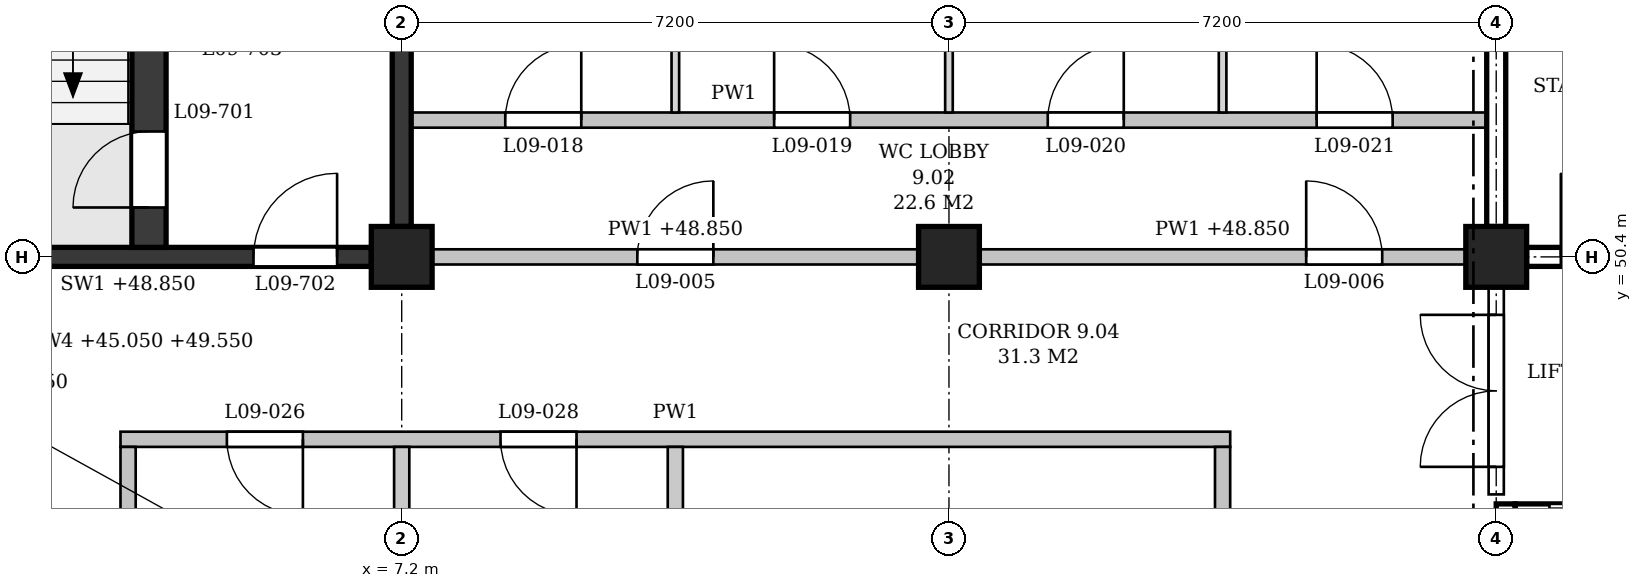
"""IFC4 building model, lengths in metres.
Left out: names, types, materials, properties, quantities, classifications, styles, units other than length and angle.
Written with IfcOpenShell. Run it as: python <this file> out.ifc"""

import sys

from ifc_helpers import new_model, si_unit, direction, frame, frame_2d, origin, origin_2d, place, context, subcontext, project, spatial, polyline, rectangle, outline, extrude, element, fill, save


model = new_model("IFC4")
c1 = context("Model", 3, precision=1e-05, world=origin(), true_north=direction((0.0, 1.0)))
c2 = subcontext(c1, "Body", "Model", "MODEL_VIEW")
j1 = project(units=[si_unit("LENGTHUNIT", "METRE"), si_unit("PLANEANGLEUNIT", "RADIAN")], contexts=[c1])
p1 = place(None, origin())
s1 = spatial("IfcSite", under=j1, at=p1, CompositionType="ELEMENT")
p2 = place(p1, origin())
s2 = spatial("IfcBuilding", under=s1, at=p2, CompositionType="ELEMENT")
p3 = place(p2, frame((0.0, 0.0, 45.3)))
s3 = spatial("IfcBuildingStorey", under=s2, at=p3, CompositionType="ELEMENT", Elevation=45.3)
for number, where, z_axis, x_axis in (
    (1, (7.2, 50.4, 0.0), (0.0, 0.0, 1.0), (1.0, 0.0, 0.0)),
    (2, (14.4, 50.4, 0.0), (0.0, 0.0, 1.0), (1.0, 0.0, 0.0)),
    (3, (21.6, 50.4, 0.0), (0.0, 0.0, 1.0), (1.0, 0.0, 0.0)),
):
    element("IfcColumn", number, at=place(p3, frame(where, z_axis=z_axis, x_axis=x_axis)), inside=s3, PredefinedType="COLUMN", context=c2, shape_type="SweptSolid", body=[
        extrude(rectangle(XDim=0.8, YDim=0.8, at=origin_2d()), origin(), (0.0, 0.0, 1.0), 4.5),
    ])
p4 = place(p3, frame((0.4, 50.4, 0.0), z_axis=(0.0, 0.0, 1.0), x_axis=(1.0, 0.0, 0.0)))
e4 = element("IfcWall", 4, at=p4, inside=s3, PredefinedType="SHEAR", context=c2, shape_type="SweptSolid", body=[
    extrude(rectangle(XDim=6.4, YDim=0.25, at=frame_2d((3.2, 0.0))), origin(), (0.0, 0.0, 1.0), 3.55),
])
p5 = place(p4, frame((4.85, 0.0, 0.0)))
e5 = element("IfcOpeningElement", 5, at=p5, cuts=e4, PredefinedType="OPENING", context=c2, shape_type="SweptSolid", body=[
    extrude(rectangle(XDim=1.1, YDim=2.1, at=frame_2d((0.55, 1.05))), frame((0.0, 0.135, 0.0), z_axis=(0.0, -1.0, 0.0), x_axis=(1.0, 0.0, 0.0)), (0.0, 0.0, 1.0), 0.27),
])
p6 = place(p3, frame((7.2, 50.8, 0.0), z_axis=(0.0, 0.0, 1.0), x_axis=(0.0, 1.0, 0.0)))
e6 = element("IfcWall", 6, at=p6, inside=s3, PredefinedType="SHEAR", context=c2, shape_type="SweptSolid", body=[
    extrude(rectangle(XDim=6.4, YDim=0.25, at=frame_2d((3.2, 0.0))), origin(), (0.0, 0.0, 1.0), 3.55),
])
p7 = place(p3, frame((3.875, 50.525, 0.0), z_axis=(0.0, 0.0, 1.0), x_axis=(0.0, 1.0, 0.0)))
e7 = element("IfcWall", 7, at=p7, inside=s3, PredefinedType="SHEAR", context=c2, shape_type="SweptSolid", body=[
    extrude(rectangle(XDim=6.925, YDim=0.45, at=frame_2d((3.462, 0.0))), origin(), (0.0, 0.0, 1.0), 4.25),
])
p8 = place(p7, frame((0.525, 0.0, 0.0)))
e8 = element("IfcOpeningElement", 8, at=p8, cuts=e7, PredefinedType="OPENING", context=c2, shape_type="SweptSolid", body=[
    extrude(rectangle(XDim=1.0, YDim=2.1, at=frame_2d((0.5, 1.05))), frame((0.0, 0.235, 0.0), z_axis=(0.0, -1.0, 0.0), x_axis=(1.0, 0.0, 0.0)), (0.0, 0.0, 1.0), 0.47),
])
p9 = place(p3, frame((22.0, 50.4, 0.0), z_axis=(0.0, 0.0, 1.0), x_axis=(1.0, 0.0, 0.0)))
e9 = element("IfcWall", 9, at=p9, inside=s3, PredefinedType="SHEAR", context=c2, shape_type="SweptSolid", body=[
    extrude(rectangle(XDim=6.4, YDim=0.25, at=frame_2d((3.2, 0.0))), origin(), (0.0, 0.0, 1.0), 3.55),
])
p10 = place(p9, frame((0.45, 0.0, 0.0)))
e10 = element("IfcOpeningElement", 10, at=p10, cuts=e9, PredefinedType="OPENING", context=c2, shape_type="SweptSolid", body=[
    extrude(rectangle(XDim=1.1, YDim=2.1, at=frame_2d((0.55, 1.05))), frame((0.0, 0.135, 0.0), z_axis=(0.0, -1.0, 0.0), x_axis=(1.0, 0.0, 0.0)), (0.0, 0.0, 1.0), 0.27),
])
p11 = place(p3, frame((21.6, 50.8, 0.0), z_axis=(0.0, 0.0, 1.0), x_axis=(0.0, 1.0, 0.0)))
e11 = element("IfcWall", 11, at=p11, inside=s3, PredefinedType="SHEAR", context=c2, shape_type="SweptSolid", body=[
    extrude(rectangle(XDim=6.4, YDim=0.25, at=frame_2d((3.2, 0.0))), origin(), (0.0, 0.0, 1.0), 3.55),
])
p12 = place(p3, frame((21.725, 43.6, -0.25), z_axis=(0.0, 0.0, 1.0), x_axis=(0.0, 1.0, 0.0)))
e12 = element("IfcWall", 12, at=p12, inside=s3, PredefinedType="SHEAR", context=c2, shape_type="SweptSolid", body=[
    extrude(rectangle(XDim=3.55, YDim=0.25, at=frame_2d((1.775, 0.0))), origin(), (0.0, 0.0, 1.0), 3.8),
])
p13 = place(p3, frame((21.85, 47.025, -0.25), z_axis=(0.0, 0.0, 1.0), x_axis=(1.0, 0.0, 0.0)))
e13 = element("IfcWall", 13, at=p13, inside=s3, PredefinedType="SHEAR", context=c2, shape_type="SweptSolid", body=[
    extrude(rectangle(XDim=2.0, YDim=0.25, at=frame_2d((1.0, 0.0))), origin(), (0.0, 0.0, 1.0), 4.5),
])
p14 = place(p13, frame((0.45, 0.0, 0.25)))
e14 = element("IfcOpeningElement", 14, at=p14, cuts=e13, PredefinedType="OPENING", context=c2, shape_type="SweptSolid", body=[
    extrude(rectangle(XDim=1.1, YDim=2.1, at=frame_2d((0.55, 1.05))), frame((0.0, 0.135, 0.0), z_axis=(0.0, -1.0, 0.0), x_axis=(1.0, 0.0, 0.0)), (0.0, 0.0, 1.0), 0.27),
])
p15 = place(p3, frame((3.5, 48.0, 0.0), z_axis=(0.0, 0.0, 1.0), x_axis=(1.0, 0.0, 0.0)))
e15 = element("IfcWall", 15, at=p15, inside=s3, PredefinedType="PARTITIONING", context=c2, shape_type="SweptSolid", body=[
    extrude(outline(polyline([(0.0, 0.0), (14.6, 0.0), (14.6, 4.25), (11.125, 4.25), (11.125, 3.55), (10.675, 3.55), (10.675, 4.25), (3.925, 4.25), (3.925, 3.55), (3.475, 3.55), (3.475, 4.25), (0.0, 4.25), (0.0, 0.0)])), frame((0.0, 0.1, 0.0), z_axis=(0.0, -1.0, 0.0), x_axis=(1.0, 0.0, 0.0)), (0.0, 0.0, 1.0), 0.2),
])
p16 = place(p15, frame((1.4, 0.0, 0.0)))
e16 = element("IfcOpeningElement", 16, at=p16, cuts=e15, PredefinedType="OPENING", context=c2, shape_type="SweptSolid", body=[
    extrude(rectangle(XDim=1.0, YDim=2.1, at=frame_2d((0.5, 1.05))), frame((0.0, 0.11, 0.0), z_axis=(0.0, -1.0, 0.0), x_axis=(1.0, 0.0, 0.0)), (0.0, 0.0, 1.0), 0.22),
])
p17 = place(p15, frame((5.0, 0.0, 0.0)))
e17 = element("IfcOpeningElement", 17, at=p17, cuts=e15, PredefinedType="OPENING", context=c2, shape_type="SweptSolid", body=[
    extrude(rectangle(XDim=1.0, YDim=2.1, at=frame_2d((0.5, 1.05))), frame((0.0, 0.11, 0.0), z_axis=(0.0, -1.0, 0.0), x_axis=(1.0, 0.0, 0.0)), (0.0, 0.0, 1.0), 0.22),
])
p18 = place(p3, frame((7.6, 50.4, 0.0), z_axis=(0.0, 0.0, 1.0), x_axis=(1.0, 0.0, 0.0)))
e18 = element("IfcWall", 18, at=p18, inside=s3, PredefinedType="PARTITIONING", context=c2, shape_type="SweptSolid", body=[
    extrude(rectangle(XDim=6.4, YDim=0.2, at=frame_2d((3.2, 0.0))), origin(), (0.0, 0.0, 1.0), 3.55),
])
p19 = place(p18, frame((2.7, 0.0, 0.0)))
e19 = element("IfcOpeningElement", 19, at=p19, cuts=e18, PredefinedType="OPENING", context=c2, shape_type="SweptSolid", body=[
    extrude(rectangle(XDim=1.0, YDim=2.1, at=frame_2d((0.5, 1.05))), frame((0.0, 0.11, 0.0), z_axis=(0.0, -1.0, 0.0), x_axis=(1.0, 0.0, 0.0)), (0.0, 0.0, 1.0), 0.22),
])
p20 = place(p3, frame((14.8, 50.4, 0.0), z_axis=(0.0, 0.0, 1.0), x_axis=(1.0, 0.0, 0.0)))
e20 = element("IfcWall", 20, at=p20, inside=s3, PredefinedType="PARTITIONING", context=c2, shape_type="SweptSolid", body=[
    extrude(rectangle(XDim=6.4, YDim=0.2, at=frame_2d((3.2, 0.0))), origin(), (0.0, 0.0, 1.0), 3.55),
])
p21 = place(p20, frame((4.3, 0.0, 0.0)))
e21 = element("IfcOpeningElement", 21, at=p21, cuts=e20, PredefinedType="OPENING", context=c2, shape_type="SweptSolid", body=[
    extrude(rectangle(XDim=1.0, YDim=2.1, at=frame_2d((0.5, 1.05))), frame((0.0, 0.11, 0.0), z_axis=(0.0, -1.0, 0.0), x_axis=(1.0, 0.0, 0.0)), (0.0, 0.0, 1.0), 0.22),
])
p22 = place(p3, frame((7.325, 52.2, 0.0), z_axis=(0.0, 0.0, 1.0), x_axis=(1.0, 0.0, 0.0)))
e22 = element("IfcWall", 22, at=p22, inside=s3, PredefinedType="PARTITIONING", context=c2, shape_type="SweptSolid", body=[
    extrude(outline(polyline([(0.0, 0.0), (14.15, 0.0), (14.15, 3.55), (14.05, 3.55), (14.05, 4.25), (7.3, 4.25), (7.3, 3.55), (6.85, 3.55), (6.85, 4.25), (0.1, 4.25), (0.1, 3.55), (0.0, 3.55), (0.0, 0.0)])), frame((0.0, 0.1, 0.0), z_axis=(0.0, -1.0, 0.0), x_axis=(1.0, 0.0, 0.0)), (0.0, 0.0, 1.0), 0.2),
])
p23 = place(p22, frame((1.238, 0.0, 0.0)))
e23 = element("IfcOpeningElement", 23, at=p23, cuts=e22, PredefinedType="OPENING", context=c2, shape_type="SweptSolid", body=[
    extrude(rectangle(XDim=1.0, YDim=2.1, at=frame_2d((0.5, 1.05))), frame((0.0, 0.11, 0.0), z_axis=(0.0, -1.0, 0.0), x_axis=(1.0, 0.0, 0.0)), (0.0, 0.0, 1.0), 0.22),
])
p24 = place(p22, frame((4.775, 0.0, 0.0)))
e24 = element("IfcOpeningElement", 24, at=p24, cuts=e22, PredefinedType="OPENING", context=c2, shape_type="SweptSolid", body=[
    extrude(rectangle(XDim=1.0, YDim=2.1, at=frame_2d((0.5, 1.05))), frame((0.0, 0.11, 0.0), z_axis=(0.0, -1.0, 0.0), x_axis=(1.0, 0.0, 0.0)), (0.0, 0.0, 1.0), 0.22),
])
p25 = place(p22, frame((8.375, 0.0, 0.0)))
e25 = element("IfcOpeningElement", 25, at=p25, cuts=e22, PredefinedType="OPENING", context=c2, shape_type="SweptSolid", body=[
    extrude(rectangle(XDim=1.0, YDim=2.1, at=frame_2d((0.5, 1.05))), frame((0.0, 0.11, 0.0), z_axis=(0.0, -1.0, 0.0), x_axis=(1.0, 0.0, 0.0)), (0.0, 0.0, 1.0), 0.22),
])
p26 = place(p22, frame((11.913, 0.0, 0.0)))
e26 = element("IfcOpeningElement", 26, at=p26, cuts=e22, PredefinedType="OPENING", context=c2, shape_type="SweptSolid", body=[
    extrude(rectangle(XDim=1.0, YDim=2.1, at=frame_2d((0.5, 1.05))), frame((0.0, 0.11, 0.0), z_axis=(0.0, -1.0, 0.0), x_axis=(1.0, 0.0, 0.0)), (0.0, 0.0, 1.0), 0.22),
])
p27 = place(p3, frame((3.6, 46.8, 0.0), z_axis=(0.0, 0.0, 1.0), x_axis=(0.0, 1.0, 0.0)))
e27 = element("IfcWall", 27, at=p27, inside=s3, PredefinedType="PARTITIONING", context=c2, shape_type="SweptSolid", body=[
    extrude(rectangle(XDim=1.1, YDim=0.2, at=frame_2d((0.55, 0.0))), origin(), (0.0, 0.0, 1.0), 4.25),
])
p28 = place(p3, frame((7.2, 43.6, 0.0), z_axis=(0.0, 0.0, 1.0), x_axis=(0.0, 1.0, 0.0)))
e28 = element("IfcWall", 28, at=p28, inside=s3, PredefinedType="PARTITIONING", context=c2, shape_type="SweptSolid", body=[
    extrude(rectangle(XDim=4.3, YDim=0.2, at=frame_2d((2.15, 0.0))), origin(), (0.0, 0.0, 1.0), 3.55),
])
p29 = place(p3, frame((10.8, 36.15, 0.0), z_axis=(0.0, 0.0, 1.0), x_axis=(0.0, 1.0, 0.0)))
e29 = element("IfcWall", 29, at=p29, inside=s3, PredefinedType="PARTITIONING", context=c2, shape_type="SweptSolid", body=[
    extrude(outline(polyline([(0.0, 0.0), (11.75, 0.0), (11.75, 4.25), (7.275, 4.25), (7.275, 3.55), (6.825, 3.55), (6.825, 4.25), (0.05, 4.25), (0.05, 3.65), (0.0, 3.65), (0.0, 0.0)])), frame((0.0, 0.1, 0.0), z_axis=(0.0, -1.0, 0.0), x_axis=(1.0, 0.0, 0.0)), (0.0, 0.0, 1.0), 0.2),
])
p30 = place(p3, frame((10.8, 52.3, 0.0), z_axis=(0.0, 0.0, 1.0), x_axis=(0.0, 1.0, 0.0)))
e30 = element("IfcWall", 30, at=p30, inside=s3, PredefinedType="PARTITIONING", context=c2, shape_type="SweptSolid", body=[
    extrude(rectangle(XDim=5.15, YDim=0.1, at=frame_2d((2.575, 0.0))), origin(), (0.0, 0.0, 1.0), 3.55),
])
p31 = place(p3, frame((14.4, 52.3, 0.0), z_axis=(0.0, 0.0, 1.0), x_axis=(0.0, 1.0, 0.0)))
e31 = element("IfcWall", 31, at=p31, inside=s3, PredefinedType="PARTITIONING", context=c2, shape_type="SweptSolid", body=[
    extrude(rectangle(XDim=4.9, YDim=0.1, at=frame_2d((2.45, 0.0))), origin(), (0.0, 0.0, 1.0), 3.55),
])
p32 = place(p3, frame((18.0, 40.9, 0.0), z_axis=(0.0, 0.0, 1.0), x_axis=(0.0, 1.0, 0.0)))
e32 = element("IfcWall", 32, at=p32, inside=s3, PredefinedType="PARTITIONING", context=c2, shape_type="SweptSolid", body=[
    extrude(outline(polyline([(0.0, 0.0), (7.0, 0.0), (7.0, 4.25), (2.525, 4.25), (2.525, 3.55), (2.075, 3.55), (2.075, 4.25), (0.0, 4.25), (0.0, 0.0)])), frame((0.0, 0.1, 0.0), z_axis=(0.0, -1.0, 0.0), x_axis=(1.0, 0.0, 0.0)), (0.0, 0.0, 1.0), 0.2),
])
p33 = place(p32, frame((3.0, 0.0, 0.0)))
e33 = element("IfcOpeningElement", 33, at=p33, cuts=e32, PredefinedType="OPENING", context=c2, shape_type="SweptSolid", body=[
    extrude(rectangle(XDim=1.0, YDim=2.1, at=frame_2d((0.5, 1.05))), frame((0.0, 0.11, 0.0), z_axis=(0.0, -1.0, 0.0), x_axis=(1.0, 0.0, 0.0)), (0.0, 0.0, 1.0), 0.22),
])
p34 = place(p3, frame((18.0, 52.3, 0.0), z_axis=(0.0, 0.0, 1.0), x_axis=(0.0, 1.0, 0.0)))
e34 = element("IfcWall", 34, at=p34, inside=s3, PredefinedType="PARTITIONING", context=c2, shape_type="SweptSolid", body=[
    extrude(rectangle(XDim=5.15, YDim=0.1, at=frame_2d((2.575, 0.0))), origin(), (0.0, 0.0, 1.0), 3.55),
])
p35 = place(p3, frame((21.6, 47.275, 0.0), z_axis=(0.0, 0.0, 1.0), x_axis=(0.0, 1.0, 0.0)))
e35 = element("IfcWall", 35, at=p35, inside=s3, PredefinedType="PARTITIONING", context=c2, shape_type="SweptSolid", body=[
    extrude(rectangle(XDim=2.725, YDim=0.2, at=frame_2d((1.363, 0.0))), origin(), (0.0, 0.0, 1.0), 3.55),
])
p36 = place(p35, frame((0.363, 0.0, 0.0)))
e36 = element("IfcOpeningElement", 36, at=p36, cuts=e35, PredefinedType="OPENING", context=c2, shape_type="SweptSolid", body=[
    extrude(rectangle(XDim=2.0, YDim=2.4, at=frame_2d((1.0, 1.2))), frame((0.0, 0.11, 0.0), z_axis=(0.0, -1.0, 0.0), x_axis=(1.0, 0.0, 0.0)), (0.0, 0.0, 1.0), 0.22),
])
p37 = place(p8, origin())
e37 = element("IfcDoor", 37, at=p37, inside=s3, OperationType="SINGLE_SWING_LEFT", PredefinedType="DOOR", context=c2, shape_type="SweptSolid", body=[
    extrude(rectangle(XDim=1.0, YDim=2.1, at=frame_2d((0.5, 1.05))), frame((0.0, 0.025, 0.0), z_axis=(0.0, -1.0, 0.0), x_axis=(1.0, 0.0, 0.0)), (0.0, 0.0, 1.0), 0.05),
])
fill(e8, e37)
p38 = place(p5, origin())
e38 = element("IfcDoor", 38, at=p38, inside=s3, OperationType="SINGLE_SWING_RIGHT", PredefinedType="DOOR", context=c2, shape_type="SweptSolid", body=[
    extrude(rectangle(XDim=1.1, YDim=2.1, at=frame_2d((0.55, 1.05))), frame((0.0, 0.025, 0.0), z_axis=(0.0, -1.0, 0.0), x_axis=(1.0, 0.0, 0.0)), (0.0, 0.0, 1.0), 0.05),
])
fill(e5, e38)
p39 = place(p10, origin())
e39 = element("IfcDoor", 39, at=p39, inside=s3, OperationType="SINGLE_SWING_LEFT", PredefinedType="DOOR", context=c2, shape_type="SweptSolid", body=[
    extrude(rectangle(XDim=1.1, YDim=2.1, at=frame_2d((0.55, 1.05))), frame((0.0, 0.025, 0.0), z_axis=(0.0, -1.0, 0.0), x_axis=(1.0, 0.0, 0.0)), (0.0, 0.0, 1.0), 0.05),
])
fill(e10, e39)
p40 = place(p36, origin())
e40 = element("IfcDoor", 40, at=p40, inside=s3, OperationType="DOUBLE_DOOR_SINGLE_SWING", PredefinedType="DOOR", context=c2, shape_type="SweptSolid", body=[
    extrude(rectangle(XDim=2.0, YDim=2.4, at=frame_2d((1.0, 1.2))), frame((0.0, 0.025, 0.0), z_axis=(0.0, -1.0, 0.0), x_axis=(1.0, 0.0, 0.0)), (0.0, 0.0, 1.0), 0.05),
])
fill(e36, e40)
p41 = place(p19, origin())
e41 = element("IfcDoor", 41, at=p41, inside=s3, OperationType="SINGLE_SWING_RIGHT", PredefinedType="DOOR", context=c2, shape_type="SweptSolid", body=[
    extrude(rectangle(XDim=1.0, YDim=2.1, at=frame_2d((0.5, 1.05))), frame((0.0, 0.025, 0.0), z_axis=(0.0, -1.0, 0.0), x_axis=(1.0, 0.0, 0.0)), (0.0, 0.0, 1.0), 0.05),
])
fill(e19, e41)
p42 = place(p21, origin())
e42 = element("IfcDoor", 42, at=p42, inside=s3, OperationType="SINGLE_SWING_LEFT", PredefinedType="DOOR", context=c2, shape_type="SweptSolid", body=[
    extrude(rectangle(XDim=1.0, YDim=2.1, at=frame_2d((0.5, 1.05))), frame((0.0, 0.025, 0.0), z_axis=(0.0, -1.0, 0.0), x_axis=(1.0, 0.0, 0.0)), (0.0, 0.0, 1.0), 0.05),
])
fill(e21, e42)
p43 = place(p23, origin())
e43 = element("IfcDoor", 43, at=p43, inside=s3, OperationType="SINGLE_SWING_RIGHT", PredefinedType="DOOR", context=c2, shape_type="SweptSolid", body=[
    extrude(rectangle(XDim=1.0, YDim=2.1, at=frame_2d((0.5, 1.05))), frame((0.0, 0.025, 0.0), z_axis=(0.0, -1.0, 0.0), x_axis=(1.0, 0.0, 0.0)), (0.0, 0.0, 1.0), 0.05),
])
fill(e23, e43)
p44 = place(p24, origin())
e44 = element("IfcDoor", 44, at=p44, inside=s3, OperationType="SINGLE_SWING_LEFT", PredefinedType="DOOR", context=c2, shape_type="SweptSolid", body=[
    extrude(rectangle(XDim=1.0, YDim=2.1, at=frame_2d((0.5, 1.05))), frame((0.0, 0.025, 0.0), z_axis=(0.0, -1.0, 0.0), x_axis=(1.0, 0.0, 0.0)), (0.0, 0.0, 1.0), 0.05),
])
fill(e24, e44)
p45 = place(p25, origin())
e45 = element("IfcDoor", 45, at=p45, inside=s3, OperationType="SINGLE_SWING_RIGHT", PredefinedType="DOOR", context=c2, shape_type="SweptSolid", body=[
    extrude(rectangle(XDim=1.0, YDim=2.1, at=frame_2d((0.5, 1.05))), frame((0.0, 0.025, 0.0), z_axis=(0.0, -1.0, 0.0), x_axis=(1.0, 0.0, 0.0)), (0.0, 0.0, 1.0), 0.05),
])
fill(e25, e45)
p46 = place(p26, origin())
e46 = element("IfcDoor", 46, at=p46, inside=s3, OperationType="SINGLE_SWING_LEFT", PredefinedType="DOOR", context=c2, shape_type="SweptSolid", body=[
    extrude(rectangle(XDim=1.0, YDim=2.1, at=frame_2d((0.5, 1.05))), frame((0.0, 0.025, 0.0), z_axis=(0.0, -1.0, 0.0), x_axis=(1.0, 0.0, 0.0)), (0.0, 0.0, 1.0), 0.05),
])
fill(e26, e46)
p47 = place(p16, frame((1.0, 0.0, 0.0), z_axis=(0.0, 0.0, 1.0), x_axis=(-1.0, 0.0, 0.0)))
e47 = element("IfcDoor", 47, at=p47, inside=s3, OperationType="SINGLE_SWING_LEFT", PredefinedType="DOOR", context=c2, shape_type="SweptSolid", body=[
    extrude(rectangle(XDim=1.0, YDim=2.1, at=frame_2d((0.5, 1.05))), frame((0.0, 0.025, 0.0), z_axis=(0.0, -1.0, 0.0), x_axis=(1.0, 0.0, 0.0)), (0.0, 0.0, 1.0), 0.05),
])
fill(e16, e47)
p48 = place(p17, frame((1.0, 0.0, 0.0), z_axis=(0.0, 0.0, 1.0), x_axis=(-1.0, 0.0, 0.0)))
e48 = element("IfcDoor", 48, at=p48, inside=s3, OperationType="SINGLE_SWING_LEFT", PredefinedType="DOOR", context=c2, shape_type="SweptSolid", body=[
    extrude(rectangle(XDim=1.0, YDim=2.1, at=frame_2d((0.5, 1.05))), frame((0.0, 0.025, 0.0), z_axis=(0.0, -1.0, 0.0), x_axis=(1.0, 0.0, 0.0)), (0.0, 0.0, 1.0), 0.05),
])
fill(e17, e48)
save(model, sys.argv[1])
